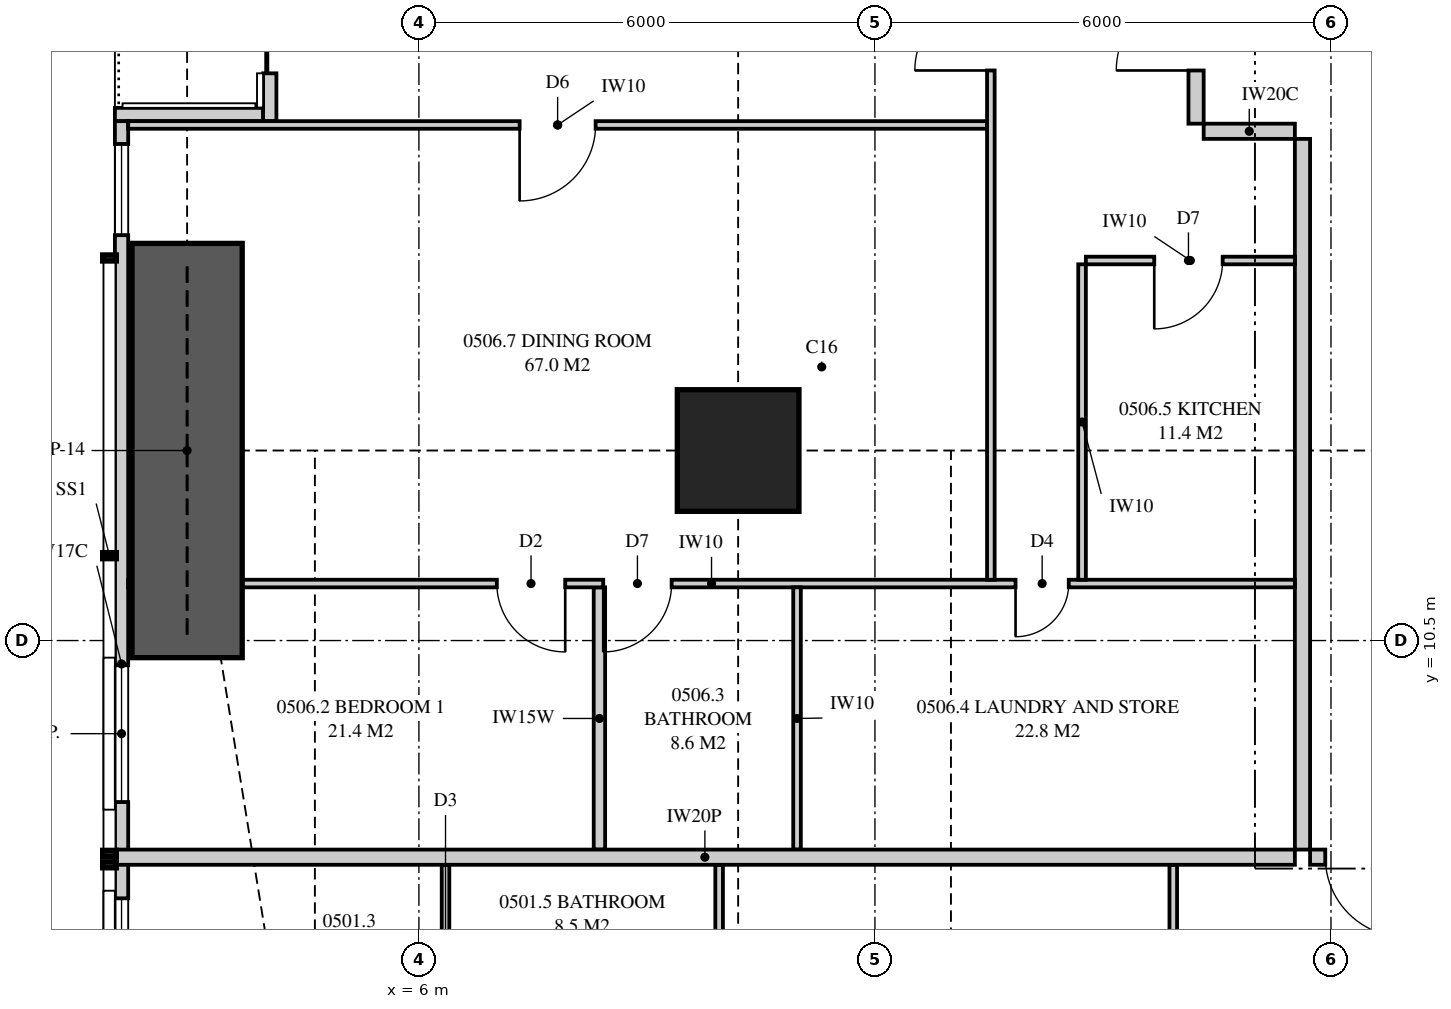
"""IFC4 building model, lengths in metres.
Left out: names, types, materials, properties, quantities, classifications, styles, units other than length and angle.
Written with IfcOpenShell. Run it as: python <this file> out.ifc"""

import sys

from ifc_helpers import new_model, si_unit, direction, frame, frame_2d, origin, origin_2d, place, context, subcontext, project, spatial, polyline, rectangle, outline, extrude, element, fill, save


model = new_model("IFC4")
c1 = context("Model", 3, precision=1e-05, world=origin(), true_north=direction((0.0, 1.0)))
c2 = subcontext(c1, "Body", "Model", "MODEL_VIEW")
j1 = project(units=[si_unit("LENGTHUNIT", "METRE"), si_unit("PLANEANGLEUNIT", "RADIAN")], contexts=[c1])
p1 = place(None, origin())
s1 = spatial("IfcSite", under=j1, at=p1, CompositionType="ELEMENT")
p2 = place(p1, origin())
s2 = spatial("IfcBuilding", under=s1, at=p2, CompositionType="ELEMENT")
p3 = place(p2, frame((0.0, 0.0, 24.35)))
s3 = spatial("IfcBuildingStorey", under=s2, at=p3, CompositionType="ELEMENT", Elevation=24.35)
p4 = place(p3, frame((10.2, 13.0, 0.0), z_axis=(0.0, 0.0, 1.0), x_axis=(1.0, 0.0, 0.0)))
e1 = element("IfcColumn", 1, at=p4, inside=s3, PredefinedType="COLUMN", context=c2, shape_type="SweptSolid", body=[
    extrude(rectangle(XDim=1.6, YDim=1.6, at=origin_2d()), origin(), (0.0, 0.0, 1.0), 3.35),
])
p5 = place(p3, frame((2.087, 17.333, 0.0), z_axis=(0.0, 0.0, 1.0), x_axis=(0.0, -1.0, 0.0)))
e2 = element("IfcWall", 2, at=p5, inside=s3, PredefinedType="SOLIDWALL", context=c2, shape_type="SweptSolid", body=[
    extrude(outline(polyline([(0.0, 0.0), (14.282, 0.0), (14.282, 3.11), (4.552, 3.11), (4.552, 2.15), (4.459, 2.15), (4.459, 3.11), (4.333, 3.11), (4.333, 2.15), (0.0, 2.15), (0.0, 0.0)])), frame((0.0, 0.087, 0.0), z_axis=(0.0, -1.0, 0.0), x_axis=(1.0, 0.0, 0.0)), (0.0, 0.0, 1.0), 0.175),
])
p6 = place(p5, frame((0.3, 0.0, 0.4)))
e3 = element("IfcOpeningElement", 3, at=p6, cuts=e2, PredefinedType="OPENING", context=c2, shape_type="SweptSolid", body=[
    extrude(rectangle(XDim=1.2, YDim=1.7, at=frame_2d((0.6, 0.85))), frame((0.0, 0.097, 0.0), z_axis=(0.0, -1.0, 0.0), x_axis=(1.0, 0.0, 0.0)), (0.0, 0.0, 1.0), 0.195),
])
p7 = place(p5, frame((7.158, 0.0, 0.4)))
e4 = element("IfcOpeningElement", 4, at=p7, cuts=e2, PredefinedType="OPENING", context=c2, shape_type="SweptSolid", body=[
    extrude(rectangle(XDim=1.8, YDim=1.7, at=frame_2d((0.9, 0.85))), frame((0.0, 0.097, 0.0), z_axis=(0.0, -1.0, 0.0), x_axis=(1.0, 0.0, 0.0)), (0.0, 0.0, 1.0), 0.195),
])
p8 = place(p5, frame((10.225, 0.0, 0.4)))
e5 = element("IfcOpeningElement", 5, at=p8, cuts=e2, PredefinedType="OPENING", context=c2, shape_type="SweptSolid", body=[
    extrude(rectangle(XDim=1.8, YDim=1.7, at=frame_2d((0.9, 0.85))), frame((0.0, 0.097, 0.0), z_axis=(0.0, -1.0, 0.0), x_axis=(1.0, 0.0, 0.0)), (0.0, 0.0, 1.0), 0.195),
])
p9 = place(p3, frame((4.038, 20.392, 0.0), z_axis=(0.0, 0.0, 1.0), x_axis=(0.0, -1.0, 0.0)))
e6 = element("IfcWall", 6, at=p9, inside=s3, PredefinedType="SOLIDWALL", context=c2, shape_type="SweptSolid", body=[
    extrude(rectangle(XDim=3.058, YDim=0.175, at=frame_2d((1.529, 0.0))), origin(), (0.0, 0.0, 1.0), 3.11),
])
p10 = place(p9, frame((0.629, 0.0, 0.0)))
e7 = element("IfcOpeningElement", 7, at=p10, cuts=e6, PredefinedType="OPENING", context=c2, shape_type="SweptSolid", body=[
    extrude(rectangle(XDim=1.8, YDim=2.1, at=frame_2d((0.9, 1.05))), frame((0.0, 0.097, 0.0), z_axis=(0.0, -1.0, 0.0), x_axis=(1.0, 0.0, 0.0)), (0.0, 0.0, 1.0), 0.195),
])
p11 = place(p3, frame((2.0, 17.421, 0.0), z_axis=(0.0, 0.0, 1.0), x_axis=(1.0, 0.0, 0.0)))
e8 = element("IfcWall", 8, at=p11, inside=s3, PredefinedType="SOLIDWALL", context=c2, shape_type="SweptSolid", body=[
    extrude(outline(polyline([(0.0, 0.0), (1.95, 0.0), (1.95, 3.11), (1.75, 3.11), (1.75, 2.15), (0.15, 2.15), (0.15, 3.11), (0.0, 3.11), (0.0, 0.0)])), frame((0.0, 0.087, 0.0), z_axis=(0.0, -1.0, 0.0), x_axis=(1.0, 0.0, 0.0)), (0.0, 0.0, 1.0), 0.175),
])
p12 = place(p3, frame((17.725, 7.65, 0.0), z_axis=(0.0, 0.0, 1.0), x_axis=(1.0, 0.0, 0.0)))
e9 = element("IfcWall", 9, at=p12, inside=s3, PredefinedType="PARTITIONING", context=c2, shape_type="SweptSolid", body=[
    extrude(rectangle(XDim=4.125, YDim=0.2, at=frame_2d((2.062, 0.0))), origin(), (0.0, 0.0, 1.0), 3.11),
])
p13 = place(p12, frame((0.2, 0.0, 0.0)))
e10 = element("IfcOpeningElement", 10, at=p13, cuts=e9, PredefinedType="OPENING", context=c2, shape_type="SweptSolid", body=[
    extrude(rectangle(XDim=1.05, YDim=2.2, at=frame_2d((0.525, 1.1))), frame((0.0, 0.11, 0.0), z_axis=(0.0, -1.0, 0.0), x_axis=(1.0, 0.0, 0.0)), (0.0, 0.0, 1.0), 0.22),
])
p14 = place(p3, frame((6.35, 0.175, 0.0), z_axis=(0.0, 0.0, 1.0), x_axis=(0.0, 1.0, 0.0)))
e11 = element("IfcWall", 11, at=p14, inside=s3, PredefinedType="PARTITIONING", context=c2, shape_type="SweptSolid", body=[
    extrude(outline(polyline([(0.0, 0.0), (7.375, 0.0), (7.375, 3.11), (2.988, 3.11), (2.988, 2.15), (1.234, 2.15), (1.234, 3.11), (0.0, 3.11), (0.0, 0.0)])), frame((0.0, 0.05, 0.0), z_axis=(0.0, -1.0, 0.0), x_axis=(1.0, 0.0, 0.0)), (0.0, 0.0, 1.0), 0.1),
])
p15 = place(p14, frame((3.492, 0.0, 0.0)))
e12 = element("IfcOpeningElement", 12, at=p15, cuts=e11, PredefinedType="OPENING", context=c2, shape_type="SweptSolid", body=[
    extrude(rectangle(XDim=0.9, YDim=2.1, at=frame_2d((0.45, 1.05))), frame((0.0, 0.06, 0.0), z_axis=(0.0, -1.0, 0.0), x_axis=(1.0, 0.0, 0.0)), (0.0, 0.0, 1.0), 0.12),
])
p16 = place(p14, frame((5.559, 0.0, 0.0)))
e13 = element("IfcOpeningElement", 13, at=p16, cuts=e11, PredefinedType="OPENING", context=c2, shape_type="SweptSolid", body=[
    extrude(rectangle(XDim=0.9, YDim=2.1, at=frame_2d((0.45, 1.05))), frame((0.0, 0.06, 0.0), z_axis=(0.0, -1.0, 0.0), x_axis=(1.0, 0.0, 0.0)), (0.0, 0.0, 1.0), 0.12),
])
p17 = place(p3, frame((9.95, 1.513, 0.0), z_axis=(0.0, 0.0, 1.0), x_axis=(0.0, 1.0, 0.0)))
e14 = element("IfcWall", 14, at=p17, inside=s3, PredefinedType="PARTITIONING", context=c2, shape_type="SweptSolid", body=[
    extrude(outline(polyline([(0.0, 0.0), (6.037, 0.0), (6.037, 2.51), (0.927, 2.51), (0.927, 2.15), (0.0, 2.15), (0.0, 0.0)])), frame((0.0, 0.05, 0.0), z_axis=(0.0, -1.0, 0.0), x_axis=(1.0, 0.0, 0.0)), (0.0, 0.0, 1.0), 0.1),
])
p18 = place(p17, frame((2.188, 0.0, 0.0)))
e15 = element("IfcOpeningElement", 15, at=p18, cuts=e14, PredefinedType="OPENING", context=c2, shape_type="SweptSolid", body=[
    extrude(rectangle(XDim=0.9, YDim=2.1, at=frame_2d((0.45, 1.05))), frame((0.0, 0.06, 0.0), z_axis=(0.0, -1.0, 0.0), x_axis=(1.0, 0.0, 0.0)), (0.0, 0.0, 1.0), 0.12),
])
p19 = place(p17, frame((3.612, 0.0, 0.0)))
e16 = element("IfcOpeningElement", 16, at=p19, cuts=e14, PredefinedType="OPENING", context=c2, shape_type="SweptSolid", body=[
    extrude(rectangle(XDim=0.9, YDim=2.1, at=frame_2d((0.45, 1.05))), frame((0.0, 0.06, 0.0), z_axis=(0.0, -1.0, 0.0), x_axis=(1.0, 0.0, 0.0)), (0.0, 0.0, 1.0), 0.12),
])
p20 = place(p3, frame((15.925, 0.175, 0.0), z_axis=(0.0, 0.0, 1.0), x_axis=(0.0, 1.0, 0.0)))
e17 = element("IfcWall", 17, at=p20, inside=s3, PredefinedType="PARTITIONING", context=c2, shape_type="SweptSolid", body=[
    extrude(outline(polyline([(0.0, 0.0), (7.375, 0.0), (7.375, 3.11), (1.635, 3.11), (1.635, 2.15), (0.0, 2.15), (0.0, 3.11), (0.0, 0.0)])), frame((0.0, 0.05, 0.0), z_axis=(0.0, -1.0, 0.0), x_axis=(1.0, 0.0, 0.0)), (0.0, 0.0, 1.0), 0.1),
])
p21 = place(p20, frame((3.188, 0.0, 0.0)))
e18 = element("IfcOpeningElement", 18, at=p21, cuts=e17, PredefinedType="OPENING", context=c2, shape_type="SweptSolid", body=[
    extrude(rectangle(XDim=1.0, YDim=2.1, at=frame_2d((0.5, 1.05))), frame((0.0, 0.06, 0.0), z_axis=(0.0, -1.0, 0.0), x_axis=(1.0, 0.0, 0.0)), (0.0, 0.0, 1.0), 0.12),
])
p22 = place(p3, frame((2.0, 7.65, 0.0), z_axis=(0.0, 0.0, 1.0), x_axis=(1.0, 0.0, 0.0)))
e19 = element("IfcWall", 19, at=p22, inside=s3, PredefinedType="PARTITIONING", context=c2, shape_type="SweptSolid", body=[
    extrude(outline(polyline([(0.0, 0.0), (15.525, 0.0), (15.525, 3.11), (11.337, 3.11), (11.337, 2.541), (10.663, 2.541), (10.663, 3.11), (9.51, 3.11), (9.51, 2.51), (6.89, 2.51), (6.89, 3.11), (2.969, 3.11), (2.969, 2.541), (2.74, 2.541), (2.74, 2.15), (0.896, 2.15), (0.896, 3.11), (0.0, 3.11), (0.0, 0.0)])), frame((0.0, 0.1, 0.0), z_axis=(0.0, -1.0, 0.0), x_axis=(1.0, 0.0, 0.0)), (0.0, 0.0, 1.0), 0.2),
])
p23 = place(p3, frame((17.625, 7.75, 0.0), z_axis=(0.0, 0.0, 1.0), x_axis=(0.0, 1.0, 0.0)))
e20 = element("IfcWall", 20, at=p23, inside=s3, PredefinedType="PARTITIONING", context=c2, shape_type="SweptSolid", body=[
    extrude(outline(polyline([(0.0, 0.0), (9.35, 0.0), (9.35, 3.11), (5.587, 3.11), (5.587, 2.541), (4.913, 2.541), (4.913, 3.11), (0.0, 3.11), (0.0, 0.0)])), frame((0.0, 0.1, 0.0), z_axis=(0.0, -1.0, 0.0), x_axis=(1.0, 0.0, 0.0)), (0.0, 0.0, 1.0), 0.2),
])
p24 = place(p3, frame((2.175, 11.25, 0.0), z_axis=(0.0, 0.0, 1.0), x_axis=(1.0, 0.0, 0.0)))
e21 = element("IfcWall", 21, at=p24, inside=s3, PredefinedType="PARTITIONING", context=c2, shape_type="SweptSolid", body=[
    extrude(outline(polyline([(0.188, 3.11), (0.0, 3.11), (0.0, 0.0), (0.529, 0.0), (0.529, 0.263), (1.021, 0.263), (1.021, 0.0), (15.35, 0.0), (15.35, 3.11), (11.112, 3.11), (11.112, 2.541), (10.538, 2.541), (10.538, 3.11), (9.285, 3.11), (9.285, 2.51), (6.765, 2.51), (6.765, 3.11), (2.744, 3.11), (2.744, 2.541), (2.169, 2.541), (2.169, 3.11), (1.93, 3.11), (1.93, 2.15), (1.021, 2.15), (1.021, 1.887), (0.529, 1.887), (0.529, 2.15), (0.188, 2.15), (0.188, 3.11)])), frame((0.0, 0.05, 0.0), z_axis=(0.0, -1.0, 0.0), x_axis=(1.0, 0.0, 0.0)), (0.0, 0.0, 1.0), 0.1),
])
p25 = place(p24, frame((4.85, 0.0, 0.0)))
e22 = element("IfcOpeningElement", 22, at=p25, cuts=e21, PredefinedType="OPENING", context=c2, shape_type="SweptSolid", body=[
    extrude(rectangle(XDim=0.9, YDim=2.1, at=frame_2d((0.45, 1.05))), frame((0.0, 0.06, 0.0), z_axis=(0.0, -1.0, 0.0), x_axis=(1.0, 0.0, 0.0)), (0.0, 0.0, 1.0), 0.12),
])
p26 = place(p24, frame((6.25, 0.0, 0.0)))
e23 = element("IfcOpeningElement", 23, at=p26, cuts=e21, PredefinedType="OPENING", context=c2, shape_type="SweptSolid", body=[
    extrude(rectangle(XDim=0.9, YDim=2.1, at=frame_2d((0.45, 1.05))), frame((0.0, 0.06, 0.0), z_axis=(0.0, -1.0, 0.0), x_axis=(1.0, 0.0, 0.0)), (0.0, 0.0, 1.0), 0.12),
])
p27 = place(p24, frame((11.675, 0.0, 0.0)))
e24 = element("IfcOpeningElement", 24, at=p27, cuts=e21, PredefinedType="OPENING", context=c2, shape_type="SweptSolid", body=[
    extrude(rectangle(XDim=0.7, YDim=2.1, at=frame_2d((0.35, 1.05))), frame((0.0, 0.06, 0.0), z_axis=(0.0, -1.0, 0.0), x_axis=(1.0, 0.0, 0.0)), (0.0, 0.0, 1.0), 0.12),
])
p28 = place(p3, frame((8.375, 7.75, 0.0), z_axis=(0.0, 0.0, 1.0), x_axis=(0.0, 1.0, 0.0)))
e25 = element("IfcWall", 25, at=p28, inside=s3, PredefinedType="PLUMBINGWALL", context=c2, shape_type="SweptSolid", body=[
    extrude(rectangle(XDim=3.45, YDim=0.15, at=frame_2d((1.725, 0.0))), origin(), (0.0, 0.0, 1.0), 3.11),
])
p29 = place(p3, frame((10.975, 7.75, 0.0), z_axis=(0.0, 0.0, 1.0), x_axis=(0.0, 1.0, 0.0)))
e26 = element("IfcWall", 26, at=p29, inside=s3, PredefinedType="PARTITIONING", context=c2, shape_type="SweptSolid", body=[
    extrude(outline(polyline([(0.0, 0.0), (3.45, 0.0), (3.45, 3.11), (3.45, 2.51), (0.0, 2.51), (0.0, 3.11), (0.0, 0.0)])), frame((0.0, 0.05, 0.0), z_axis=(0.0, -1.0, 0.0), x_axis=(1.0, 0.0, 0.0)), (0.0, 0.0, 1.0), 0.1),
])
p30 = place(p3, frame((13.525, 11.3, 0.0), z_axis=(0.0, 0.0, 1.0), x_axis=(0.0, 1.0, 0.0)))
e27 = element("IfcWall", 27, at=p30, inside=s3, PredefinedType="PARTITIONING", context=c2, shape_type="SweptSolid", body=[
    extrude(outline(polyline([(0.0, 0.0), (17.95, 0.0), (17.95, 3.11), (13.987, 3.11), (13.987, 2.541), (13.413, 2.541), (13.413, 3.11), (1.987, 3.11), (1.987, 2.541), (1.413, 2.541), (1.413, 3.11), (0.0, 3.11), (0.0, 0.0)])), frame((0.0, 0.05, 0.0), z_axis=(0.0, -1.0, 0.0), x_axis=(1.0, 0.0, 0.0)), (0.0, 0.0, 1.0), 0.1),
])
p31 = place(p30, frame((6.7, 0.0, 0.0)))
e28 = element("IfcOpeningElement", 28, at=p31, cuts=e27, PredefinedType="OPENING", context=c2, shape_type="SweptSolid", body=[
    extrude(rectangle(XDim=1.0, YDim=2.1, at=frame_2d((0.5, 1.05))), frame((0.0, 0.06, 0.0), z_axis=(0.0, -1.0, 0.0), x_axis=(1.0, 0.0, 0.0)), (0.0, 0.0, 1.0), 0.12),
])
p32 = place(p3, frame((14.725, 11.3, 0.0), z_axis=(0.0, 0.0, 1.0), x_axis=(0.0, 1.0, 0.0)))
e29 = element("IfcWall", 29, at=p32, inside=s3, PredefinedType="PARTITIONING", context=c2, shape_type="SweptSolid", body=[
    extrude(outline(polyline([(0.0, 0.0), (4.15, 0.0), (4.15, 3.11), (1.987, 3.11), (1.987, 2.541), (1.413, 2.541), (1.413, 3.11), (0.0, 3.11), (0.0, 0.0)])), frame((0.0, 0.05, 0.0), z_axis=(0.0, -1.0, 0.0), x_axis=(1.0, 0.0, 0.0)), (0.0, 0.0, 1.0), 0.1),
])
p33 = place(p3, frame((14.775, 15.5, 0.0), z_axis=(0.0, 0.0, 1.0), x_axis=(1.0, 0.0, 0.0)))
e30 = element("IfcWall", 30, at=p33, inside=s3, PredefinedType="PARTITIONING", context=c2, shape_type="SweptSolid", body=[
    extrude(rectangle(XDim=2.75, YDim=0.1, at=frame_2d((1.375, 0.0))), origin(), (0.0, 0.0, 1.0), 3.11),
])
p34 = place(p33, frame((0.9, 0.0, 0.0)))
e31 = element("IfcOpeningElement", 31, at=p34, cuts=e30, PredefinedType="OPENING", context=c2, shape_type="SweptSolid", body=[
    extrude(rectangle(XDim=0.9, YDim=2.1, at=frame_2d((0.45, 1.05))), frame((0.0, 0.06, 0.0), z_axis=(0.0, -1.0, 0.0), x_axis=(1.0, 0.0, 0.0)), (0.0, 0.0, 1.0), 0.12),
])
p35 = place(p3, frame((2.175, 17.283, 0.0), z_axis=(0.0, 0.0, 1.0), x_axis=(1.0, 0.0, 0.0)))
e32 = element("IfcWall", 32, at=p35, inside=s3, PredefinedType="PARTITIONING", context=c2, shape_type="SweptSolid", body=[
    extrude(outline(polyline([(0.0, 0.0), (11.3, 0.0), (11.3, 3.11), (9.285, 3.11), (9.285, 2.51), (6.765, 2.51), (6.765, 3.11), (1.635, 3.11), (1.635, 2.15), (0.0, 2.15), (0.0, 3.11), (0.0, 0.0)])), frame((0.0, 0.05, 0.0), z_axis=(0.0, -1.0, 0.0), x_axis=(1.0, 0.0, 0.0)), (0.0, 0.0, 1.0), 0.1),
])
p36 = place(p35, frame((5.15, 0.0, 0.0)))
e33 = element("IfcOpeningElement", 33, at=p36, cuts=e32, PredefinedType="OPENING", context=c2, shape_type="SweptSolid", body=[
    extrude(rectangle(XDim=1.0, YDim=2.1, at=frame_2d((0.5, 1.05))), frame((0.0, 0.06, 0.0), z_axis=(0.0, -1.0, 0.0), x_axis=(1.0, 0.0, 0.0)), (0.0, 0.0, 1.0), 0.12),
])
p37 = place(p3, frame((16.225, 17.3, 0.0), z_axis=(0.0, 0.0, 1.0), x_axis=(0.0, 1.0, 0.0)))
e34 = element("IfcWall", 34, at=p37, inside=s3, PredefinedType="PARTITIONING", context=c2, shape_type="SweptSolid", body=[
    extrude(rectangle(XDim=2.4, YDim=0.2, at=frame_2d((1.2, 0.0))), origin(), (0.0, 0.0, 1.0), 3.11),
])
p38 = place(p37, frame((0.7, 0.0, 0.0)))
e35 = element("IfcOpeningElement", 35, at=p38, cuts=e34, PredefinedType="OPENING", context=c2, shape_type="SweptSolid", body=[
    extrude(rectangle(XDim=1.05, YDim=2.2, at=frame_2d((0.525, 1.1))), frame((0.0, 0.11, 0.0), z_axis=(0.0, -1.0, 0.0), x_axis=(1.0, 0.0, 0.0)), (0.0, 0.0, 1.0), 0.22),
])
p39 = place(p3, frame((17.525, 17.2, 0.0), z_axis=(0.0, 0.0, 1.0), x_axis=(-1.0, 0.0, 0.0)))
e36 = element("IfcWall", 36, at=p39, inside=s3, PredefinedType="PARTITIONING", context=c2, shape_type="SweptSolid", body=[
    extrude(rectangle(XDim=1.2, YDim=0.2, at=frame_2d((0.6, 0.0))), origin(), (0.0, 0.0, 1.0), 3.11),
])
p40 = place(p3, frame((2.95, 10.275, 0.0), z_axis=(0.0, 0.0, 1.0), x_axis=(0.0, 1.0, 0.0)))
e37 = element("IfcWall", 37, at=p40, inside=s3, PredefinedType="SHEAR", context=c2, shape_type="SweptSolid", body=[
    extrude(rectangle(XDim=5.45, YDim=1.45, at=frame_2d((2.725, 0.0))), origin(), (0.0, 0.0, 1.0), 3.35),
])
p41 = place(p10, origin())
e38 = element("IfcDoor", 38, at=p41, inside=s3, OperationType="SLIDING_TO_LEFT", PredefinedType="DOOR", context=c2, shape_type="SweptSolid", body=[
    extrude(rectangle(XDim=1.8, YDim=2.1, at=frame_2d((0.9, 1.05))), frame((0.0, 0.025, 0.0), z_axis=(0.0, -1.0, 0.0), x_axis=(1.0, 0.0, 0.0)), (0.0, 0.0, 1.0), 0.05),
])
fill(e7, e38)
p42 = place(p6, origin())
e39 = element("IfcWindow", 39, at=p42, inside=s3, PartitioningType="SINGLE_PANEL", PredefinedType="WINDOW", context=c2, shape_type="SweptSolid", body=[
    extrude(rectangle(XDim=1.2, YDim=1.7, at=frame_2d((0.6, 0.85))), frame((0.0, 0.03, 0.0), z_axis=(0.0, -1.0, 0.0), x_axis=(1.0, 0.0, 0.0)), (0.0, 0.0, 1.0), 0.06),
])
fill(e3, e39)
p43 = place(p7, origin())
e40 = element("IfcWindow", 40, at=p43, inside=s3, PartitioningType="SINGLE_PANEL", PredefinedType="WINDOW", context=c2, shape_type="SweptSolid", body=[
    extrude(rectangle(XDim=1.8, YDim=1.7, at=frame_2d((0.9, 0.85))), frame((0.0, 0.03, 0.0), z_axis=(0.0, -1.0, 0.0), x_axis=(1.0, 0.0, 0.0)), (0.0, 0.0, 1.0), 0.06),
])
fill(e4, e40)
p44 = place(p8, origin())
e41 = element("IfcWindow", 41, at=p44, inside=s3, PartitioningType="SINGLE_PANEL", PredefinedType="WINDOW", context=c2, shape_type="SweptSolid", body=[
    extrude(rectangle(XDim=1.8, YDim=1.7, at=frame_2d((0.9, 0.85))), frame((0.0, 0.03, 0.0), z_axis=(0.0, -1.0, 0.0), x_axis=(1.0, 0.0, 0.0)), (0.0, 0.0, 1.0), 0.06),
])
fill(e5, e41)
p45 = place(p13, frame((1.05, 0.0, 0.0), z_axis=(0.0, 0.0, 1.0), x_axis=(-1.0, 0.0, 0.0)))
e42 = element("IfcDoor", 42, at=p45, inside=s3, OperationType="SINGLE_SWING_LEFT", PredefinedType="DOOR", context=c2, shape_type="SweptSolid", body=[
    extrude(rectangle(XDim=1.05, YDim=2.2, at=frame_2d((0.525, 1.1))), frame((0.0, 0.025, 0.0), z_axis=(0.0, -1.0, 0.0), x_axis=(1.0, 0.0, 0.0)), (0.0, 0.0, 1.0), 0.05),
])
fill(e10, e42)
p46 = place(p38, origin())
e43 = element("IfcDoor", 43, at=p46, inside=s3, OperationType="SINGLE_SWING_LEFT", PredefinedType="DOOR", context=c2, shape_type="SweptSolid", body=[
    extrude(rectangle(XDim=1.05, YDim=2.2, at=frame_2d((0.525, 1.1))), frame((0.0, 0.025, 0.0), z_axis=(0.0, -1.0, 0.0), x_axis=(1.0, 0.0, 0.0)), (0.0, 0.0, 1.0), 0.05),
])
fill(e35, e43)
p47 = place(p25, frame((0.9, 0.0, 0.0), z_axis=(0.0, 0.0, 1.0), x_axis=(-1.0, 0.0, 0.0)))
e44 = element("IfcDoor", 44, at=p47, inside=s3, OperationType="SINGLE_SWING_LEFT", PredefinedType="DOOR", context=c2, shape_type="SweptSolid", body=[
    extrude(rectangle(XDim=0.9, YDim=2.1, at=frame_2d((0.45, 1.05))), frame((0.0, 0.025, 0.0), z_axis=(0.0, -1.0, 0.0), x_axis=(1.0, 0.0, 0.0)), (0.0, 0.0, 1.0), 0.05),
])
fill(e22, e44)
p48 = place(p26, frame((0.9, 0.0, 0.0), z_axis=(0.0, 0.0, 1.0), x_axis=(-1.0, 0.0, 0.0)))
e45 = element("IfcDoor", 45, at=p48, inside=s3, OperationType="SINGLE_SWING_RIGHT", PredefinedType="DOOR", context=c2, shape_type="SweptSolid", body=[
    extrude(rectangle(XDim=0.9, YDim=2.1, at=frame_2d((0.45, 1.05))), frame((0.0, 0.025, 0.0), z_axis=(0.0, -1.0, 0.0), x_axis=(1.0, 0.0, 0.0)), (0.0, 0.0, 1.0), 0.05),
])
fill(e23, e45)
p49 = place(p27, frame((0.7, 0.0, 0.0), z_axis=(0.0, 0.0, 1.0), x_axis=(-1.0, 0.0, 0.0)))
e46 = element("IfcDoor", 46, at=p49, inside=s3, OperationType="SINGLE_SWING_RIGHT", PredefinedType="DOOR", context=c2, shape_type="SweptSolid", body=[
    extrude(rectangle(XDim=0.7, YDim=2.1, at=frame_2d((0.35, 1.05))), frame((0.0, 0.025, 0.0), z_axis=(0.0, -1.0, 0.0), x_axis=(1.0, 0.0, 0.0)), (0.0, 0.0, 1.0), 0.05),
])
fill(e24, e46)
p50 = place(p34, frame((0.9, 0.0, 0.0), z_axis=(0.0, 0.0, 1.0), x_axis=(-1.0, 0.0, 0.0)))
e47 = element("IfcDoor", 47, at=p50, inside=s3, OperationType="SINGLE_SWING_RIGHT", PredefinedType="DOOR", context=c2, shape_type="SweptSolid", body=[
    extrude(rectangle(XDim=0.9, YDim=2.1, at=frame_2d((0.45, 1.05))), frame((0.0, 0.025, 0.0), z_axis=(0.0, -1.0, 0.0), x_axis=(1.0, 0.0, 0.0)), (0.0, 0.0, 1.0), 0.05),
])
fill(e31, e47)
p51 = place(p31, origin())
e48 = element("IfcDoor", 48, at=p51, inside=s3, OperationType="SINGLE_SWING_LEFT", PredefinedType="DOOR", context=c2, shape_type="SweptSolid", body=[
    extrude(rectangle(XDim=1.0, YDim=2.1, at=frame_2d((0.5, 1.05))), frame((0.0, 0.025, 0.0), z_axis=(0.0, -1.0, 0.0), x_axis=(1.0, 0.0, 0.0)), (0.0, 0.0, 1.0), 0.05),
])
fill(e28, e48)
p52 = place(p36, frame((1.0, 0.0, 0.0), z_axis=(0.0, 0.0, 1.0), x_axis=(-1.0, 0.0, 0.0)))
e49 = element("IfcDoor", 49, at=p52, inside=s3, OperationType="SINGLE_SWING_RIGHT", PredefinedType="DOOR", context=c2, shape_type="SweptSolid", body=[
    extrude(rectangle(XDim=1.0, YDim=2.1, at=frame_2d((0.5, 1.05))), frame((0.0, 0.025, 0.0), z_axis=(0.0, -1.0, 0.0), x_axis=(1.0, 0.0, 0.0)), (0.0, 0.0, 1.0), 0.05),
])
fill(e33, e49)
save(model, sys.argv[1])
